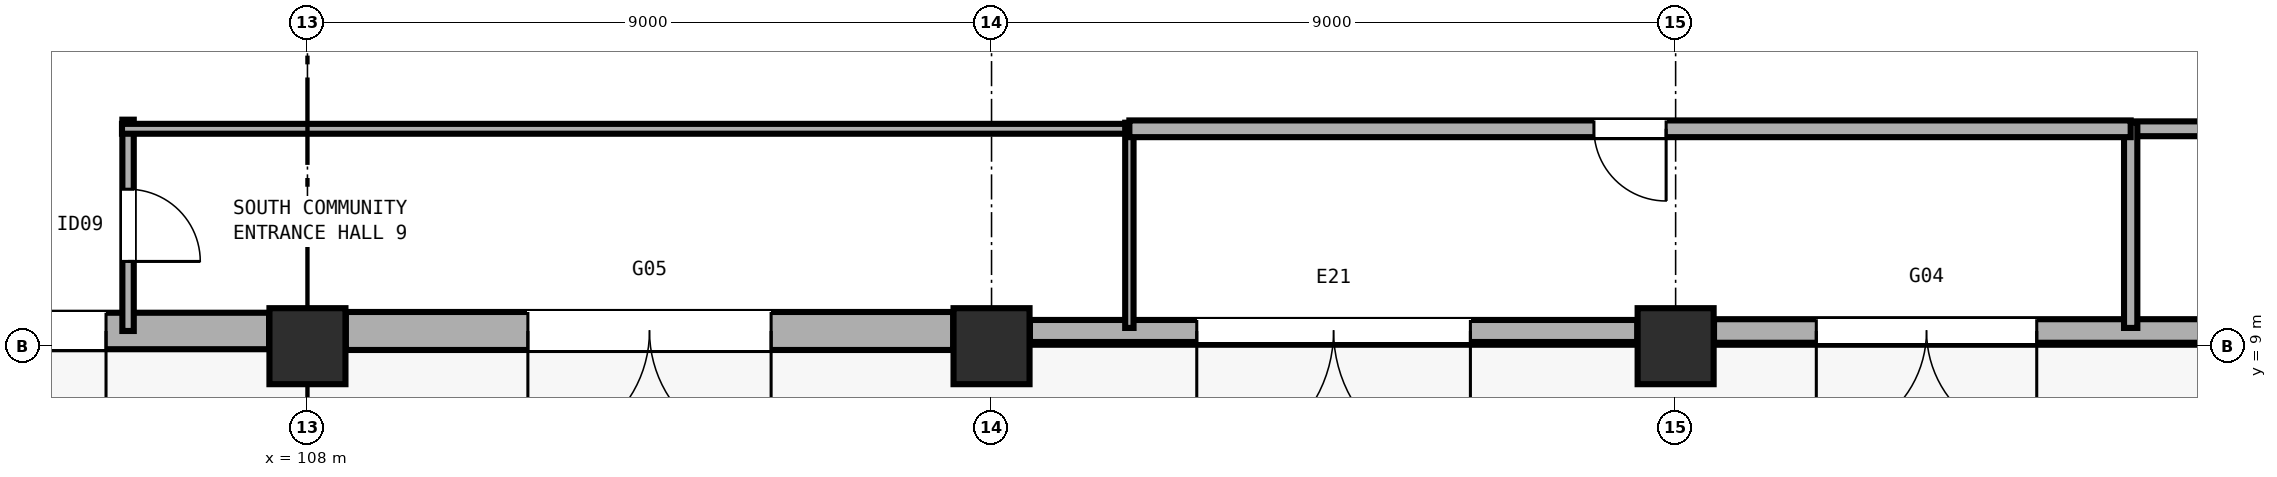
"""IFC4 building model, lengths in metres.
Left out: names, types, materials, properties, quantities, classifications, styles, units other than length and angle.
Written with IfcOpenShell. Run it as: python <this file> out.ifc"""

import sys

from ifc_helpers import new_model, si_unit, direction, frame, frame_2d, origin, origin_2d, place, context, subcontext, project, spatial, rectangle, extrude, element, fill, save


model = new_model("IFC4")
c1 = context("Model", 3, precision=1e-05, world=origin(), true_north=direction((0.0, 1.0)))
c2 = subcontext(c1, "Body", "Model", "MODEL_VIEW")
j1 = project(units=[si_unit("LENGTHUNIT", "METRE"), si_unit("PLANEANGLEUNIT", "RADIAN")], contexts=[c1])
p1 = place(None, origin())
s1 = spatial("IfcSite", under=j1, at=p1, CompositionType="ELEMENT")
p2 = place(p1, origin())
s2 = spatial("IfcBuilding", under=s1, at=p2, CompositionType="ELEMENT")
p3 = place(p2, origin())
s3 = spatial("IfcBuildingStorey", under=s2, at=p3, CompositionType="ELEMENT", Elevation=0.0)
for number, where, z_axis, x_axis in (
    (1, (108.0, 9.0, 0.0), (0.0, 0.0, 1.0), (1.0, 0.0, 0.0)),
    (2, (117.0, 9.0, 0.0), (0.0, 0.0, 1.0), (1.0, 0.0, 0.0)),
    (3, (126.0, 9.0, 0.0), (0.0, 0.0, 1.0), (1.0, 0.0, 0.0)),
):
    element("IfcColumn", number, at=place(p3, frame(where, z_axis=z_axis, x_axis=x_axis)), inside=s3, PredefinedType="COLUMN", context=c2, shape_type="SweptSolid", body=[
        extrude(rectangle(XDim=1.0, YDim=1.0, at=origin_2d()), origin(), (0.0, 0.0, 1.0), 4.8),
    ])
p4 = place(p3, frame((134.495, 9.2, 0.0), z_axis=(0.0, 0.0, 1.0), x_axis=(-1.0, 0.0, 0.0)))
e4 = element("IfcWall", 4, at=p4, inside=s3, PredefinedType="SOLIDWALL", context=c2, shape_type="SweptSolid", body=[
    extrude(rectangle(XDim=7.99, YDim=0.31, at=frame_2d((3.995, 0.0))), origin(), (0.0, 0.0, 1.0), 3.58),
])
p5 = place(p4, frame((3.744, 0.0, 0.0)))
e5 = element("IfcOpeningElement", 5, at=p5, cuts=e4, PredefinedType="OPENING", context=c2, shape_type="SweptSolid", body=[
    extrude(rectangle(XDim=2.9, YDim=2.45, at=frame_2d((1.45, 1.225))), frame((0.0, 0.165, 0.0), z_axis=(0.0, -1.0, 0.0), x_axis=(1.0, 0.0, 0.0)), (0.0, 0.0, 1.0), 0.33),
])
p6 = place(p3, frame((125.495, 9.2, 0.0), z_axis=(0.0, 0.0, 1.0), x_axis=(-1.0, 0.0, 0.0)))
e6 = element("IfcWall", 6, at=p6, inside=s3, PredefinedType="SOLIDWALL", context=c2, shape_type="SweptSolid", body=[
    extrude(rectangle(XDim=7.99, YDim=0.29, at=frame_2d((3.995, 0.0))), origin(), (0.0, 0.0, 1.0), 3.58),
])
p7 = place(p6, frame((2.195, 0.0, 0.0)))
e7 = element("IfcOpeningElement", 7, at=p7, cuts=e6, PredefinedType="OPENING", context=c2, shape_type="SweptSolid", body=[
    extrude(rectangle(XDim=3.6, YDim=2.6, at=frame_2d((1.8, 1.3))), frame((0.0, 0.155, 0.0), z_axis=(0.0, -1.0, 0.0), x_axis=(1.0, 0.0, 0.0)), (0.0, 0.0, 1.0), 0.31),
])
p8 = place(p3, frame((116.495, 9.2, 0.0), z_axis=(0.0, 0.0, 1.0), x_axis=(-1.0, 0.0, 0.0)))
e8 = element("IfcWall", 8, at=p8, inside=s3, PredefinedType="SOLIDWALL", context=c2, shape_type="SweptSolid", body=[
    extrude(rectangle(XDim=7.99, YDim=0.5, at=frame_2d((3.995, 0.0))), origin(), (0.0, 0.0, 1.0), 3.58),
])
p9 = place(p8, frame((2.395, 0.0, 0.0)))
e9 = element("IfcOpeningElement", 9, at=p9, cuts=e8, PredefinedType="OPENING", context=c2, shape_type="SweptSolid", body=[
    extrude(rectangle(XDim=3.2, YDim=2.5, at=frame_2d((1.6, 1.25))), frame((0.0, 0.26, 0.0), z_axis=(0.0, -1.0, 0.0), x_axis=(1.0, 0.0, 0.0)), (0.0, 0.0, 1.0), 0.52),
])
p10 = place(p3, frame((107.495, 9.2, 0.0), z_axis=(0.0, 0.0, 1.0), x_axis=(-1.0, 0.0, 0.0)))
e10 = element("IfcWall", 10, at=p10, inside=s3, PredefinedType="SOLIDWALL", context=c2, shape_type="SweptSolid", body=[
    extrude(rectangle(XDim=7.99, YDim=0.48, at=frame_2d((3.995, 0.0))), origin(), (0.0, 0.0, 1.0), 3.58),
])
p11 = place(p10, frame((2.145, 0.0, 0.0)))
e11 = element("IfcOpeningElement", 11, at=p11, cuts=e10, PredefinedType="OPENING", context=c2, shape_type="SweptSolid", body=[
    extrude(rectangle(XDim=3.1, YDim=2.5, at=frame_2d((1.55, 1.25))), frame((0.0, 0.25, 0.0), z_axis=(0.0, -1.0, 0.0), x_axis=(1.0, 0.0, 0.0)), (0.0, 0.0, 1.0), 0.5),
])
p12 = place(p3, frame((145.28, 11.86, 0.0), z_axis=(0.0, 0.0, 1.0), x_axis=(-1.0, 0.0, 0.0)))
e12 = element("IfcWall", 12, at=p12, inside=s3, PredefinedType="PARTITIONING", context=c2, shape_type="SweptSolid", body=[
    extrude(rectangle(XDim=13.293, YDim=0.195, at=frame_2d((6.646, 0.0))), origin(), (0.0, 0.0, 1.0), 3.28),
])
p13 = place(p12, frame((6.087, 0.0, 0.0)))
e13 = element("IfcOpeningElement", 13, at=p13, cuts=e12, PredefinedType="OPENING", context=c2, shape_type="SweptSolid", body=[
    extrude(rectangle(XDim=1.12, YDim=2.22, at=frame_2d((0.56, 1.11))), frame((0.0, 0.107, 0.0), z_axis=(0.0, -1.0, 0.0), x_axis=(1.0, 0.0, 0.0)), (0.0, 0.0, 1.0), 0.215),
])
p14 = place(p3, frame((131.987, 9.24, 0.0), z_axis=(0.0, 0.0, 1.0), x_axis=(0.0, 1.0, 0.0)))
e14 = element("IfcWall", 14, at=p14, inside=s3, PredefinedType="PARTITIONING", context=c2, shape_type="SweptSolid", body=[
    extrude(rectangle(XDim=2.7, YDim=0.175, at=frame_2d((1.35, 0.0))), origin(), (0.0, 0.0, 1.0), 3.28),
])
p15 = place(p3, frame((105.64, 11.98, 0.0), z_axis=(0.0, 0.0, 1.0), x_axis=(0.0, -1.0, 0.0)))
e15 = element("IfcWall", 15, at=p15, inside=s3, PredefinedType="PARTITIONING", context=c2, shape_type="SweptSolid", body=[
    extrude(rectangle(XDim=2.78, YDim=0.15, at=frame_2d((1.39, 0.0))), origin(), (0.0, 0.0, 1.0), 3.28),
])
p16 = place(p15, frame((0.915, 0.0, 0.0)))
e16 = element("IfcOpeningElement", 16, at=p16, cuts=e15, PredefinedType="OPENING", context=c2, shape_type="SweptSolid", body=[
    extrude(rectangle(XDim=0.95, YDim=2.1, at=frame_2d((0.475, 1.05))), frame((0.0, 0.085, 0.0), z_axis=(0.0, -1.0, 0.0), x_axis=(1.0, 0.0, 0.0)), (0.0, 0.0, 1.0), 0.17),
])
p17 = place(p3, frame((105.56, 11.86, 0.0), z_axis=(0.0, 0.0, 1.0), x_axis=(1.0, 0.0, 0.0)))
e17 = element("IfcWall", 17, at=p17, inside=s3, PredefinedType="PARTITIONING", context=c2, shape_type="SweptSolid", body=[
    extrude(rectangle(XDim=13.213, YDim=0.13, at=frame_2d((6.606, 0.0))), origin(), (0.0, 0.0, 1.0), 3.28),
])
p18 = place(p3, frame((118.813, 11.94, 0.0), z_axis=(0.0, 0.0, 1.0), x_axis=(0.0, -1.0, 0.0)))
e18 = element("IfcWall", 18, at=p18, inside=s3, PredefinedType="PARTITIONING", context=c2, shape_type="SweptSolid", body=[
    extrude(rectangle(XDim=2.7, YDim=0.11, at=frame_2d((1.35, 0.0))), origin(), (0.0, 0.0, 1.0), 3.28),
])
p19 = place(p3, frame((131.987, 11.86, 0.0), z_axis=(0.0, 0.0, 1.0), x_axis=(-1.0, 0.0, 0.0)))
e19 = element("IfcWall", 19, at=p19, inside=s3, PredefinedType="PARTITIONING", context=c2, shape_type="SweptSolid", body=[
    extrude(rectangle(XDim=13.174, YDim=0.22, at=frame_2d((6.587, 0.0))), origin(), (0.0, 0.0, 1.0), 3.28),
])
p20 = place(p19, frame((6.112, 0.0, 0.0)))
e20 = element("IfcOpeningElement", 20, at=p20, cuts=e19, PredefinedType="OPENING", context=c2, shape_type="SweptSolid", body=[
    extrude(rectangle(XDim=0.95, YDim=2.18, at=frame_2d((0.475, 1.09))), frame((0.0, 0.12, 0.0), z_axis=(0.0, -1.0, 0.0), x_axis=(1.0, 0.0, 0.0)), (0.0, 0.0, 1.0), 0.24),
])
p21 = place(p7, origin())
e21 = element("IfcDoor", 21, at=p21, inside=s3, OperationType="DOUBLE_DOOR_SINGLE_SWING", PredefinedType="DOOR", context=c2, shape_type="SweptSolid", body=[
    extrude(rectangle(XDim=3.6, YDim=2.6, at=frame_2d((1.8, 1.3))), frame((0.0, 0.025, 0.0), z_axis=(0.0, -1.0, 0.0), x_axis=(1.0, 0.0, 0.0)), (0.0, 0.0, 1.0), 0.05),
])
fill(e7, e21)
p22 = place(p5, origin())
e22 = element("IfcDoor", 22, at=p22, inside=s3, OperationType="DOUBLE_DOOR_SINGLE_SWING", PredefinedType="DOOR", context=c2, shape_type="SweptSolid", body=[
    extrude(rectangle(XDim=2.9, YDim=2.45, at=frame_2d((1.45, 1.225))), frame((0.0, 0.025, 0.0), z_axis=(0.0, -1.0, 0.0), x_axis=(1.0, 0.0, 0.0)), (0.0, 0.0, 1.0), 0.05),
])
fill(e5, e22)
p23 = place(p9, origin())
e23 = element("IfcDoor", 23, at=p23, inside=s3, OperationType="DOUBLE_DOOR_SINGLE_SWING", PredefinedType="DOOR", context=c2, shape_type="SweptSolid", body=[
    extrude(rectangle(XDim=3.2, YDim=2.5, at=frame_2d((1.6, 1.25))), frame((0.0, 0.025, 0.0), z_axis=(0.0, -1.0, 0.0), x_axis=(1.0, 0.0, 0.0)), (0.0, 0.0, 1.0), 0.05),
])
fill(e9, e23)
p24 = place(p11, origin())
e24 = element("IfcDoor", 24, at=p24, inside=s3, OperationType="DOUBLE_DOOR_SINGLE_SWING", PredefinedType="DOOR", context=c2, shape_type="SweptSolid", body=[
    extrude(rectangle(XDim=3.1, YDim=2.5, at=frame_2d((1.55, 1.25))), frame((0.0, 0.025, 0.0), z_axis=(0.0, -1.0, 0.0), x_axis=(1.0, 0.0, 0.0)), (0.0, 0.0, 1.0), 0.05),
])
fill(e11, e24)
p25 = place(p16, origin())
e25 = element("IfcDoor", 25, at=p25, inside=s3, OperationType="SINGLE_SWING_RIGHT", PredefinedType="DOOR", context=c2, shape_type="SweptSolid", body=[
    extrude(rectangle(XDim=0.95, YDim=2.1, at=frame_2d((0.475, 1.05))), frame((0.0, 0.025, 0.0), z_axis=(0.0, -1.0, 0.0), x_axis=(1.0, 0.0, 0.0)), (0.0, 0.0, 1.0), 0.05),
])
fill(e16, e25)
p26 = place(p20, origin())
e26 = element("IfcDoor", 26, at=p26, inside=s3, OperationType="SINGLE_SWING_LEFT", PredefinedType="DOOR", context=c2, shape_type="SweptSolid", body=[
    extrude(rectangle(XDim=0.95, YDim=2.18, at=frame_2d((0.475, 1.09))), frame((0.0, 0.025, 0.0), z_axis=(0.0, -1.0, 0.0), x_axis=(1.0, 0.0, 0.0)), (0.0, 0.0, 1.0), 0.05),
])
fill(e20, e26)
save(model, sys.argv[1])
